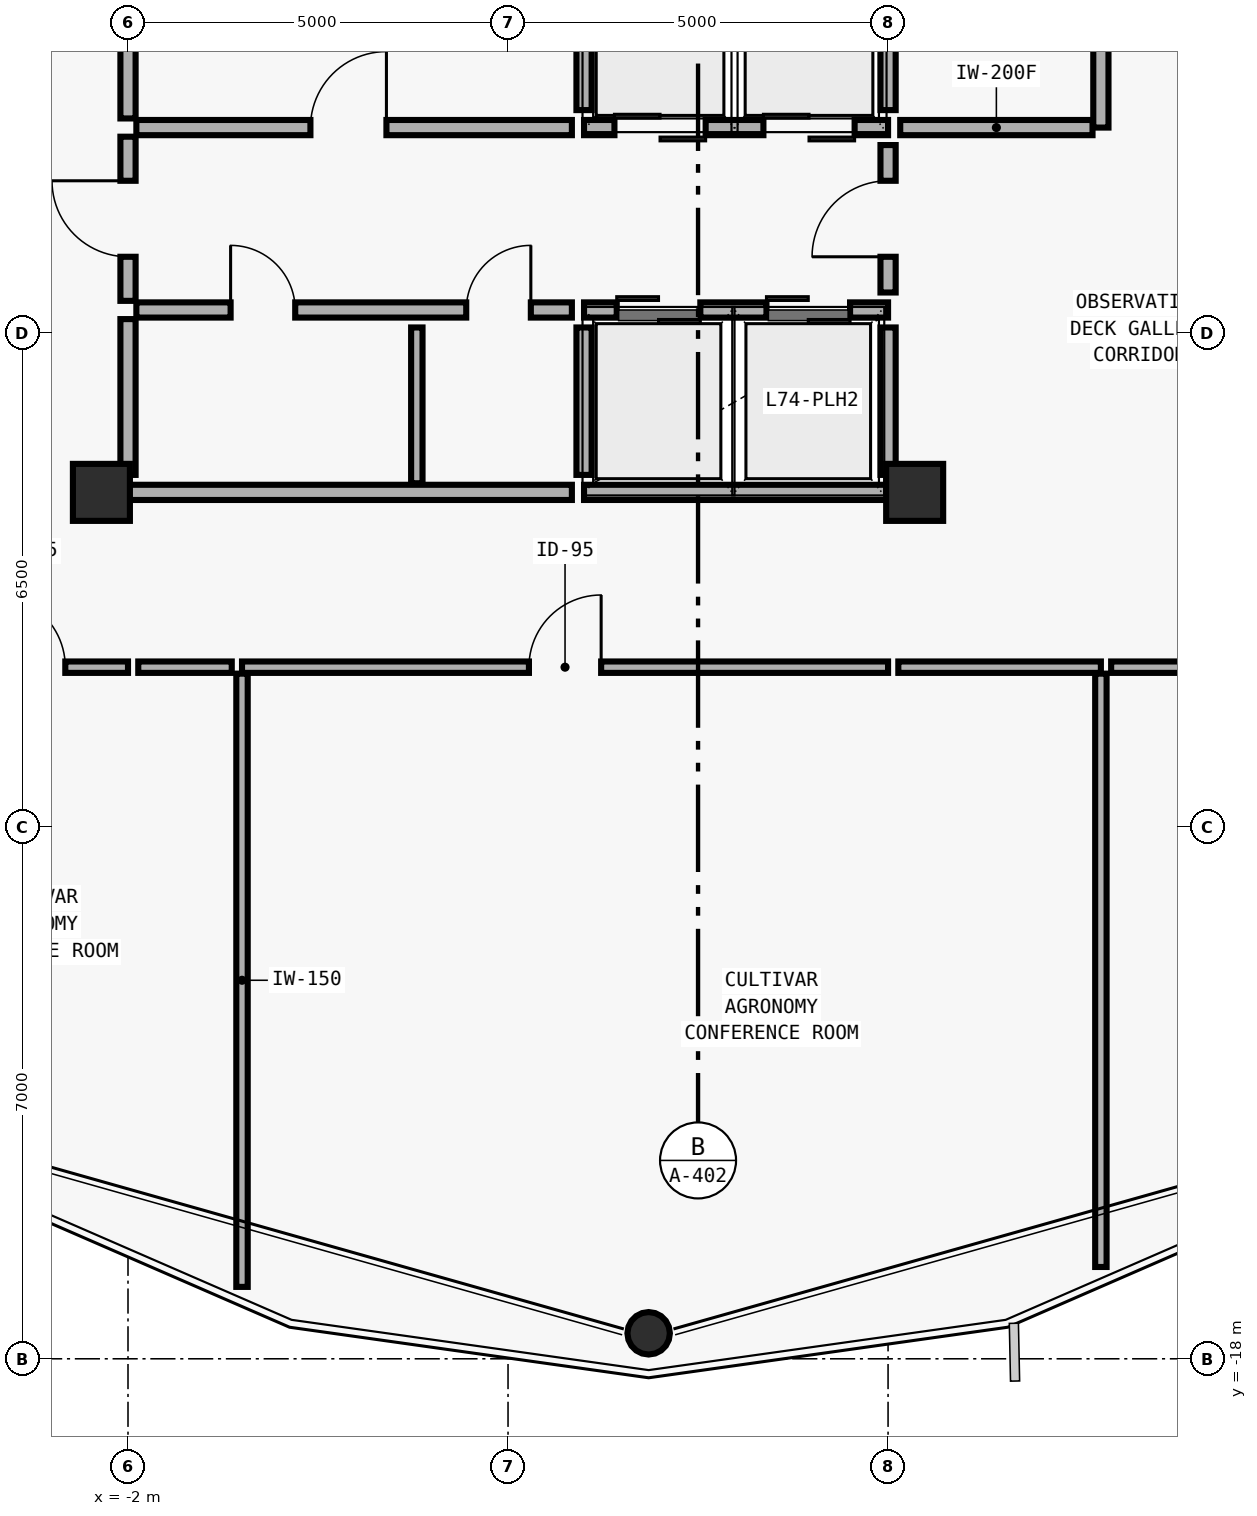
"""IFC4 building model, lengths in metres.
Left out: names, types, materials, properties, quantities, classifications, styles, units other than length and angle.
Written with IfcOpenShell. Run it as: python <this file> out.ifc"""

import sys

from ifc_helpers import new_model, si_unit, direction, frame, frame_2d, origin, origin_2d, place, context, subcontext, project, spatial, rectangle, hollow_circle, extrude, element, fill, save


model = new_model("IFC4")
c1 = context("Model", 3, precision=1e-05, world=origin(), true_north=direction((0.0, 1.0)))
c2 = subcontext(c1, "Body", "Model", "MODEL_VIEW")
j1 = project(units=[si_unit("LENGTHUNIT", "METRE"), si_unit("PLANEANGLEUNIT", "RADIAN")], contexts=[c1])
p1 = place(None, origin())
s1 = spatial("IfcSite", under=j1, at=p1, CompositionType="ELEMENT")
p2 = place(p1, origin())
s2 = spatial("IfcBuilding", under=s1, at=p2, CompositionType="ELEMENT")
p3 = place(p2, frame((0.0, 0.0, 289.5)))
s3 = spatial("IfcBuildingStorey", under=s2, at=p3, CompositionType="ELEMENT", Elevation=289.5)
for number, where, z_axis, x_axis in (
    (1, (-2.35, -6.6, 0.0), (0.0, 0.0, 1.0), (1.0, 0.0, 0.0)),
    (2, (8.35, -6.6, 0.0), (0.0, 0.0, 1.0), (1.0, 0.0, 0.0)),
):
    element("IfcColumn", number, at=place(p3, frame(where, z_axis=z_axis, x_axis=x_axis)), inside=s3, PredefinedType="COLUMN", context=c2, shape_type="SweptSolid", body=[
        extrude(rectangle(XDim=0.75, YDim=0.75, at=origin_2d()), origin(), (0.0, 0.0, 1.0), 4.475),
    ])
p4 = place(p3, frame((4.85, -17.7, 0.0), z_axis=(0.0, 0.01587361352, 0.99987400626), x_axis=(-1.0, 0.0, 0.0)))
e3 = element("IfcColumn", 3, at=p4, inside=s3, PredefinedType="COLUMN", context=c2, shape_type="SweptSolid", body=[
    extrude(hollow_circle(Radius=0.28, WallThickness=0.02, at=origin_2d()), origin(), (0.0, 0.0, 1.0), 4.476),
])
p5 = place(p3, frame((4.0, -1.8, 0.0), z_axis=(0.0, 0.0, 1.0), x_axis=(1.0, 0.0, 0.0)))
e4 = element("IfcWall", 4, at=p5, inside=s3, PredefinedType="SOLIDWALL", context=c2, shape_type="SweptSolid", body=[
    extrude(rectangle(XDim=4.0, YDim=0.2, at=frame_2d((2.0, 0.0))), origin(), (0.0, 0.0, 1.0), 4.26),
])
p6 = place(p5, frame((0.4, 0.0, 0.0)))
e5 = element("IfcOpeningElement", 5, at=p6, cuts=e4, PredefinedType="OPENING", context=c2, shape_type="SweptSolid", body=[
    extrude(rectangle(XDim=1.2, YDim=2.25, at=frame_2d((0.6, 1.125))), frame((0.0, 0.11, 0.0), z_axis=(0.0, -1.0, 0.0), x_axis=(1.0, 0.0, 0.0)), (0.0, 0.0, 1.0), 0.22),
])
p7 = place(p5, frame((2.36, 0.0, 0.0)))
e6 = element("IfcOpeningElement", 6, at=p7, cuts=e4, PredefinedType="OPENING", context=c2, shape_type="SweptSolid", body=[
    extrude(rectangle(XDim=1.2, YDim=2.25, at=frame_2d((0.6, 1.125))), frame((0.0, 0.11, 0.0), z_axis=(0.0, -1.0, 0.0), x_axis=(1.0, 0.0, 0.0)), (0.0, 0.0, 1.0), 0.22),
])
p8 = place(p3, frame((4.0, -1.57, 0.0), z_axis=(0.0, 0.0, 1.0), x_axis=(0.0, 1.0, 0.0)))
e7 = element("IfcWall", 7, at=p8, inside=s3, PredefinedType="SOLIDWALL", context=c2, shape_type="SweptSolid", body=[
    extrude(rectangle(XDim=1.94, YDim=0.2, at=frame_2d((0.97, 0.0))), origin(), (0.0, 0.0, 1.0), 4.26),
])
p9 = place(p3, frame((8.0, -1.57, 0.0), z_axis=(0.0, 0.0, 1.0), x_axis=(0.0, 1.0, 0.0)))
e8 = element("IfcWall", 8, at=p9, inside=s3, PredefinedType="SOLIDWALL", context=c2, shape_type="SweptSolid", body=[
    extrude(rectangle(XDim=2.05, YDim=0.2, at=frame_2d((1.025, 0.0))), origin(), (0.0, 0.0, 1.0), 3.972),
])
p10 = place(p3, frame((4.0, -4.2, 0.0), z_axis=(0.0, 0.0, 1.0), x_axis=(1.0, 0.0, 0.0)))
e9 = element("IfcWall", 9, at=p10, inside=s3, PredefinedType="SOLIDWALL", context=c2, shape_type="SweptSolid", body=[
    extrude(rectangle(XDim=4.0, YDim=0.2, at=frame_2d((2.0, 0.0))), origin(), (0.0, 0.0, 1.0), 4.26),
])
p11 = place(p10, frame((0.43, 0.0, 0.0)))
e10 = element("IfcOpeningElement", 10, at=p11, cuts=e9, PredefinedType="OPENING", context=c2, shape_type="SweptSolid", body=[
    extrude(rectangle(XDim=1.1, YDim=2.2, at=frame_2d((0.55, 1.1))), frame((0.0, 0.11, 0.0), z_axis=(0.0, -1.0, 0.0), x_axis=(1.0, 0.0, 0.0)), (0.0, 0.0, 1.0), 0.22),
])
p12 = place(p10, frame((2.4, 0.0, 0.0)))
e11 = element("IfcOpeningElement", 11, at=p12, cuts=e9, PredefinedType="OPENING", context=c2, shape_type="SweptSolid", body=[
    extrude(rectangle(XDim=1.1, YDim=2.2, at=frame_2d((0.55, 1.1))), frame((0.0, 0.11, 0.0), z_axis=(0.0, -1.0, 0.0), x_axis=(1.0, 0.0, 0.0)), (0.0, 0.0, 1.0), 0.22),
])
p13 = place(p3, frame((4.0, -6.6, 0.0), z_axis=(0.0, 0.0, 1.0), x_axis=(1.0, 0.0, 0.0)))
e12 = element("IfcWall", 12, at=p13, inside=s3, PredefinedType="SOLIDWALL", context=c2, shape_type="SweptSolid", body=[
    extrude(rectangle(XDim=4.0, YDim=0.2, at=frame_2d((2.0, 0.0))), origin(), (0.0, 0.0, 1.0), 3.972),
])
p14 = place(p3, frame((4.0, -6.37, 0.0), z_axis=(0.0, 0.0, 1.0), x_axis=(0.0, 1.0, 0.0)))
e13 = element("IfcWall", 13, at=p14, inside=s3, PredefinedType="SOLIDWALL", context=c2, shape_type="SweptSolid", body=[
    extrude(rectangle(XDim=1.94, YDim=0.2, at=frame_2d((0.97, 0.0))), origin(), (0.0, 0.0, 1.0), 4.26),
])
p15 = place(p3, frame((8.0, -6.37, 0.0), z_axis=(0.0, 0.0, 1.0), x_axis=(0.0, 1.0, 0.0)))
e14 = element("IfcWall", 14, at=p15, inside=s3, PredefinedType="SOLIDWALL", context=c2, shape_type="SweptSolid", body=[
    extrude(rectangle(XDim=1.94, YDim=0.2, at=frame_2d((0.97, 0.0))), origin(), (0.0, 0.0, 1.0), 3.972),
])
p16 = place(p3, frame((-2.0, -4.08, 0.0), z_axis=(0.0, 0.0, 1.0), x_axis=(0.0, 1.0, 0.0)))
e15 = element("IfcWall", 15, at=p16, inside=s3, PredefinedType="MOVABLE", context=c2, shape_type="SweptSolid", body=[
    extrude(rectangle(XDim=2.16, YDim=0.2, at=frame_2d((1.08, 0.0))), origin(), (0.0, 0.0, 1.0), 3.972),
])
p17 = place(p16, frame((0.58, 0.0, 0.0)))
e16 = element("IfcOpeningElement", 16, at=p17, cuts=e15, PredefinedType="OPENING", context=c2, shape_type="SweptSolid", body=[
    extrude(rectangle(XDim=1.0, YDim=2.1, at=frame_2d((0.5, 1.05))), frame((0.0, 0.11, 0.0), z_axis=(0.0, -1.0, 0.0), x_axis=(1.0, 0.0, 0.0)), (0.0, 0.0, 1.0), 0.22),
])
p18 = place(p3, frame((8.0, -3.97, 0.0), z_axis=(0.0, 0.0, 1.0), x_axis=(0.0, 1.0, 0.0)))
e17 = element("IfcWall", 17, at=p18, inside=s3, PredefinedType="MOVABLE", context=c2, shape_type="SweptSolid", body=[
    extrude(rectangle(XDim=1.94, YDim=0.2, at=frame_2d((0.97, 0.0))), origin(), (0.0, 0.0, 1.0), 3.972),
])
p19 = place(p18, frame((0.47, 0.0, 0.0)))
e18 = element("IfcOpeningElement", 18, at=p19, cuts=e17, PredefinedType="OPENING", context=c2, shape_type="SweptSolid", body=[
    extrude(rectangle(XDim=1.0, YDim=2.1, at=frame_2d((0.5, 1.05))), frame((0.0, 0.11, 0.0), z_axis=(0.0, -1.0, 0.0), x_axis=(1.0, 0.0, 0.0)), (0.0, 0.0, 1.0), 0.22),
])
p20 = place(p3, frame((-1.89, -1.8, 0.0), z_axis=(0.0, 0.0, 1.0), x_axis=(1.0, 0.0, 0.0)))
e19 = element("IfcWall", 19, at=p20, inside=s3, PredefinedType="MOVABLE", context=c2, shape_type="SweptSolid", body=[
    extrude(rectangle(XDim=5.73, YDim=0.2, at=frame_2d((2.865, 0.0))), origin(), (0.0, 0.0, 1.0), 4.26),
])
p21 = place(p20, frame((2.29, 0.0, 0.0)))
e20 = element("IfcOpeningElement", 20, at=p21, cuts=e19, PredefinedType="OPENING", context=c2, shape_type="SweptSolid", body=[
    extrude(rectangle(XDim=1.0, YDim=2.1, at=frame_2d((0.5, 1.05))), frame((0.0, 0.11, 0.0), z_axis=(0.0, -1.0, 0.0), x_axis=(1.0, 0.0, 0.0)), (0.0, 0.0, 1.0), 0.22),
])
p22 = place(p3, frame((-1.89, -4.2, 0.0), z_axis=(0.0, 0.0, 1.0), x_axis=(1.0, 0.0, 0.0)))
e21 = element("IfcWall", 21, at=p22, inside=s3, PredefinedType="MOVABLE", context=c2, shape_type="SweptSolid", body=[
    extrude(rectangle(XDim=5.73, YDim=0.2, at=frame_2d((2.865, 0.0))), origin(), (0.0, 0.0, 1.0), 4.26),
])
p23 = place(p22, frame((1.24, 0.0, 0.0)))
e22 = element("IfcOpeningElement", 22, at=p23, cuts=e21, PredefinedType="OPENING", context=c2, shape_type="SweptSolid", body=[
    extrude(rectangle(XDim=0.85, YDim=2.1, at=frame_2d((0.425, 1.05))), frame((0.0, 0.11, 0.0), z_axis=(0.0, -1.0, 0.0), x_axis=(1.0, 0.0, 0.0)), (0.0, 0.0, 1.0), 0.22),
])
p24 = place(p22, frame((4.34, 0.0, 0.0)))
e23 = element("IfcOpeningElement", 23, at=p24, cuts=e21, PredefinedType="OPENING", context=c2, shape_type="SweptSolid", body=[
    extrude(rectangle(XDim=0.85, YDim=2.1, at=frame_2d((0.425, 1.05))), frame((0.0, 0.11, 0.0), z_axis=(0.0, -1.0, 0.0), x_axis=(1.0, 0.0, 0.0)), (0.0, 0.0, 1.0), 0.22),
])
p25 = place(p3, frame((10.8, -1.8, 0.0), z_axis=(0.0, 0.0, 1.0), x_axis=(0.0, 1.0, 0.0)))
e24 = element("IfcWall", 24, at=p25, inside=s3, PredefinedType="MOVABLE", context=c2, shape_type="SweptSolid", body=[
    extrude(rectangle(XDim=6.3, YDim=0.2, at=frame_2d((3.15, 0.0))), origin(), (0.0, 0.0, 1.0), 4.26),
])
p26 = place(p25, frame((2.65, 0.0, 0.0)))
e25 = element("IfcOpeningElement", 25, at=p26, cuts=e24, PredefinedType="OPENING", context=c2, shape_type="SweptSolid", body=[
    extrude(rectangle(XDim=1.0, YDim=2.1, at=frame_2d((0.5, 1.05))), frame((0.0, 0.11, 0.0), z_axis=(0.0, -1.0, 0.0), x_axis=(1.0, 0.0, 0.0)), (0.0, 0.0, 1.0), 0.22),
])
p27 = place(p3, frame((-4.6, -8.9, 0.0), z_axis=(0.0, 0.0, 1.0), x_axis=(1.0, 0.0, 0.0)))
e26 = element("IfcWall", 26, at=p27, inside=s3, PredefinedType="PARTITIONING", context=c2, shape_type="SweptSolid", body=[
    extrude(rectangle(XDim=2.6, YDim=0.15, at=frame_2d((1.3, 0.0))), origin(), (0.0, 0.0, 1.0), 4.26),
])
p28 = place(p27, frame((0.825, 0.0, 0.0)))
e27 = element("IfcOpeningElement", 27, at=p28, cuts=e26, PredefinedType="OPENING", context=c2, shape_type="SweptSolid", body=[
    extrude(rectangle(XDim=0.95, YDim=2.1, at=frame_2d((0.475, 1.05))), frame((0.0, 0.085, 0.0), z_axis=(0.0, -1.0, 0.0), x_axis=(1.0, 0.0, 0.0)), (0.0, 0.0, 1.0), 0.17),
])
p29 = place(p3, frame((-0.5, -8.9, 0.0), z_axis=(0.0, 0.0, 1.0), x_axis=(1.0, 0.0, 0.0)))
e28 = element("IfcWall", 28, at=p29, inside=s3, PredefinedType="PARTITIONING", context=c2, shape_type="SweptSolid", body=[
    extrude(rectangle(XDim=8.5, YDim=0.15, at=frame_2d((4.25, 0.0))), origin(), (0.0, 0.0, 1.0), 4.26),
])
p30 = place(p29, frame((3.775, 0.0, 0.0)))
e29 = element("IfcOpeningElement", 29, at=p30, cuts=e28, PredefinedType="OPENING", context=c2, shape_type="SweptSolid", body=[
    extrude(rectangle(XDim=0.95, YDim=2.1, at=frame_2d((0.475, 1.05))), frame((0.0, 0.085, 0.0), z_axis=(0.0, -1.0, 0.0), x_axis=(1.0, 0.0, 0.0)), (0.0, 0.0, 1.0), 0.17),
])
p31 = place(p3, frame((-2.0, -1.68, 0.0), z_axis=(0.0, 0.0, 1.0), x_axis=(0.0, 1.0, 0.0)))
e30 = element("IfcWall", 30, at=p31, inside=s3, PredefinedType="MOVABLE", context=c2, shape_type="SweptSolid", body=[
    extrude(rectangle(XDim=2.16, YDim=0.2, at=frame_2d((1.08, 0.0))), origin(), (0.0, 0.0, 1.0), 3.972),
])
p32 = place(p3, frame((1.8, -6.48, 0.0), z_axis=(0.0, 0.0, 1.0), x_axis=(0.0, 1.0, 0.0)))
e31 = element("IfcWall", 31, at=p32, inside=s3, PredefinedType="PARTITIONING", context=c2, shape_type="SweptSolid", body=[
    extrude(rectangle(XDim=2.05, YDim=0.15, at=frame_2d((1.025, 0.0))), origin(), (0.0, 0.0, 1.0), 4.26),
])
p33 = place(p3, frame((-2.0, -6.6, 0.0), z_axis=(0.0, 0.0, 1.0), x_axis=(1.0, 0.0, 0.0)))
e32 = element("IfcWall", 32, at=p33, inside=s3, PredefinedType="MOVABLE", context=c2, shape_type="SweptSolid", body=[
    extrude(rectangle(XDim=5.84, YDim=0.2, at=frame_2d((2.92, 0.0))), origin(), (0.0, 0.0, 1.0), 3.972),
])
p34 = place(p3, frame((-2.0, -6.37, 0.0), z_axis=(0.0, 0.0, 1.0), x_axis=(0.0, 1.0, 0.0)))
e33 = element("IfcWall", 33, at=p34, inside=s3, PredefinedType="MOVABLE", context=c2, shape_type="SweptSolid", body=[
    extrude(rectangle(XDim=2.05, YDim=0.2, at=frame_2d((1.025, 0.0))), origin(), (0.0, 0.0, 1.0), 3.972),
])
p35 = place(p3, frame((8.16, -1.8, 0.0), z_axis=(0.0, 0.0, 1.0), x_axis=(1.0, 0.0, 0.0)))
e34 = element("IfcWall", 34, at=p35, inside=s3, PredefinedType="MOVABLE", context=c2, shape_type="SweptSolid", body=[
    extrude(rectangle(XDim=2.53, YDim=0.2, at=frame_2d((1.265, 0.0))), origin(), (0.0, 0.0, 1.0), 4.26),
])
p36 = place(p3, frame((-1.865, -8.9, 0.0), z_axis=(0.0, 0.0, 1.0), x_axis=(1.0, 0.0, 0.0)))
e35 = element("IfcWall", 35, at=p36, inside=s3, PredefinedType="PARTITIONING", context=c2, shape_type="SweptSolid", body=[
    extrude(rectangle(XDim=1.23, YDim=0.15, at=frame_2d((0.615, 0.0))), origin(), (0.0, 0.0, 1.0), 4.26),
])
p37 = place(p3, frame((-0.5, -8.985, 0.0), z_axis=(0.0, 0.0, 1.0), x_axis=(0.0, -1.0, 0.0)))
e36 = element("IfcWall", 36, at=p37, inside=s3, PredefinedType="PARTITIONING", context=c2, shape_type="SweptSolid", body=[
    extrude(rectangle(XDim=8.069, YDim=0.15, at=frame_2d((4.034, 0.0))), origin(), (0.0, 0.0, 1.0), 4.26),
])
p38 = place(p3, frame((8.135, -8.9, 0.0), z_axis=(0.0, 0.0, 1.0), x_axis=(1.0, 0.0, 0.0)))
e37 = element("IfcWall", 37, at=p38, inside=s3, PredefinedType="PARTITIONING", context=c2, shape_type="SweptSolid", body=[
    extrude(rectangle(XDim=2.665, YDim=0.15, at=frame_2d((1.333, 0.0))), origin(), (0.0, 0.0, 1.0), 4.26),
])
p39 = place(p3, frame((10.8, -8.985, 0.0), z_axis=(0.0, 0.0, 1.0), x_axis=(0.0, -1.0, 0.0)))
e38 = element("IfcWall", 38, at=p39, inside=s3, PredefinedType="PARTITIONING", context=c2, shape_type="SweptSolid", body=[
    extrude(rectangle(XDim=7.807, YDim=0.15, at=frame_2d((3.903, 0.0))), origin(), (0.0, 0.0, 1.0), 4.26),
])
p40 = place(p3, frame((10.935, -8.9, 0.0), z_axis=(0.0, 0.0, 1.0), x_axis=(1.0, 0.0, 0.0)))
e39 = element("IfcWall", 39, at=p40, inside=s3, PredefinedType="PARTITIONING", context=c2, shape_type="SweptSolid", body=[
    extrude(rectangle(XDim=3.245, YDim=0.15, at=frame_2d((1.623, 0.0))), origin(), (0.0, 0.0, 1.0), 4.26),
])
p41 = place(p17, origin())
e40 = element("IfcDoor", 40, at=p41, inside=s3, OperationType="SINGLE_SWING_RIGHT", PredefinedType="DOOR", context=c2, shape_type="SweptSolid", body=[
    extrude(rectangle(XDim=1.0, YDim=2.1, at=frame_2d((0.5, 1.05))), frame((0.0, 0.025, 0.0), z_axis=(0.0, -1.0, 0.0), x_axis=(1.0, 0.0, 0.0)), (0.0, 0.0, 1.0), 0.05),
])
fill(e16, e40)
p42 = place(p19, origin())
e41 = element("IfcDoor", 41, at=p42, inside=s3, OperationType="SINGLE_SWING_LEFT", PredefinedType="DOOR", context=c2, shape_type="SweptSolid", body=[
    extrude(rectangle(XDim=1.0, YDim=2.1, at=frame_2d((0.5, 1.05))), frame((0.0, 0.025, 0.0), z_axis=(0.0, -1.0, 0.0), x_axis=(1.0, 0.0, 0.0)), (0.0, 0.0, 1.0), 0.05),
])
fill(e18, e41)
p43 = place(p21, origin())
e42 = element("IfcDoor", 42, at=p43, inside=s3, OperationType="SINGLE_SWING_RIGHT", PredefinedType="DOOR", context=c2, shape_type="SweptSolid", body=[
    extrude(rectangle(XDim=1.0, YDim=2.1, at=frame_2d((0.5, 1.05))), frame((0.0, 0.025, 0.0), z_axis=(0.0, -1.0, 0.0), x_axis=(1.0, 0.0, 0.0)), (0.0, 0.0, 1.0), 0.05),
])
fill(e20, e42)
p44 = place(p23, origin())
e43 = element("IfcDoor", 43, at=p44, inside=s3, OperationType="SINGLE_SWING_LEFT", PredefinedType="DOOR", context=c2, shape_type="SweptSolid", body=[
    extrude(rectangle(XDim=0.85, YDim=2.1, at=frame_2d((0.425, 1.05))), frame((0.0, 0.025, 0.0), z_axis=(0.0, -1.0, 0.0), x_axis=(1.0, 0.0, 0.0)), (0.0, 0.0, 1.0), 0.05),
])
fill(e22, e43)
p45 = place(p24, origin())
e44 = element("IfcDoor", 44, at=p45, inside=s3, OperationType="SINGLE_SWING_RIGHT", PredefinedType="DOOR", context=c2, shape_type="SweptSolid", body=[
    extrude(rectangle(XDim=0.85, YDim=2.1, at=frame_2d((0.425, 1.05))), frame((0.0, 0.025, 0.0), z_axis=(0.0, -1.0, 0.0), x_axis=(1.0, 0.0, 0.0)), (0.0, 0.0, 1.0), 0.05),
])
fill(e23, e44)
p46 = place(p28, origin())
e45 = element("IfcDoor", 45, at=p46, inside=s3, OperationType="SINGLE_SWING_LEFT", PredefinedType="DOOR", context=c2, shape_type="SweptSolid", body=[
    extrude(rectangle(XDim=0.95, YDim=2.1, at=frame_2d((0.475, 1.05))), frame((0.0, 0.025, 0.0), z_axis=(0.0, -1.0, 0.0), x_axis=(1.0, 0.0, 0.0)), (0.0, 0.0, 1.0), 0.05),
])
fill(e27, e45)
p47 = place(p30, origin())
e46 = element("IfcDoor", 46, at=p47, inside=s3, OperationType="SINGLE_SWING_RIGHT", PredefinedType="DOOR", context=c2, shape_type="SweptSolid", body=[
    extrude(rectangle(XDim=0.95, YDim=2.1, at=frame_2d((0.475, 1.05))), frame((0.0, 0.025, 0.0), z_axis=(0.0, -1.0, 0.0), x_axis=(1.0, 0.0, 0.0)), (0.0, 0.0, 1.0), 0.05),
])
fill(e29, e46)
p48 = place(p6, origin())
e47 = element("IfcDoor", 47, at=p48, inside=s3, OperationType="DOUBLE_DOOR_SLIDING", PredefinedType="DOOR", context=c2, shape_type="SweptSolid", body=[
    extrude(rectangle(XDim=1.2, YDim=2.25, at=frame_2d((0.6, 1.125))), frame((0.0, 0.025, 0.0), z_axis=(0.0, -1.0, 0.0), x_axis=(1.0, 0.0, 0.0)), (0.0, 0.0, 1.0), 0.05),
])
fill(e5, e47)
p49 = place(p7, origin())
e48 = element("IfcDoor", 48, at=p49, inside=s3, OperationType="DOUBLE_DOOR_SLIDING", PredefinedType="DOOR", context=c2, shape_type="SweptSolid", body=[
    extrude(rectangle(XDim=1.2, YDim=2.25, at=frame_2d((0.6, 1.125))), frame((0.0, 0.025, 0.0), z_axis=(0.0, -1.0, 0.0), x_axis=(1.0, 0.0, 0.0)), (0.0, 0.0, 1.0), 0.05),
])
fill(e6, e48)
p50 = place(p11, origin())
e49 = element("IfcDoor", 49, at=p50, inside=s3, OperationType="DOUBLE_DOOR_SLIDING", PredefinedType="DOOR", context=c2, shape_type="SweptSolid", body=[
    extrude(rectangle(XDim=1.1, YDim=2.2, at=frame_2d((0.55, 1.1))), frame((0.0, 0.025, 0.0), z_axis=(0.0, -1.0, 0.0), x_axis=(1.0, 0.0, 0.0)), (0.0, 0.0, 1.0), 0.05),
])
fill(e10, e49)
p51 = place(p12, origin())
e50 = element("IfcDoor", 50, at=p51, inside=s3, OperationType="DOUBLE_DOOR_SLIDING", PredefinedType="DOOR", context=c2, shape_type="SweptSolid", body=[
    extrude(rectangle(XDim=1.1, YDim=2.2, at=frame_2d((0.55, 1.1))), frame((0.0, 0.025, 0.0), z_axis=(0.0, -1.0, 0.0), x_axis=(1.0, 0.0, 0.0)), (0.0, 0.0, 1.0), 0.05),
])
fill(e11, e50)
save(model, sys.argv[1])
